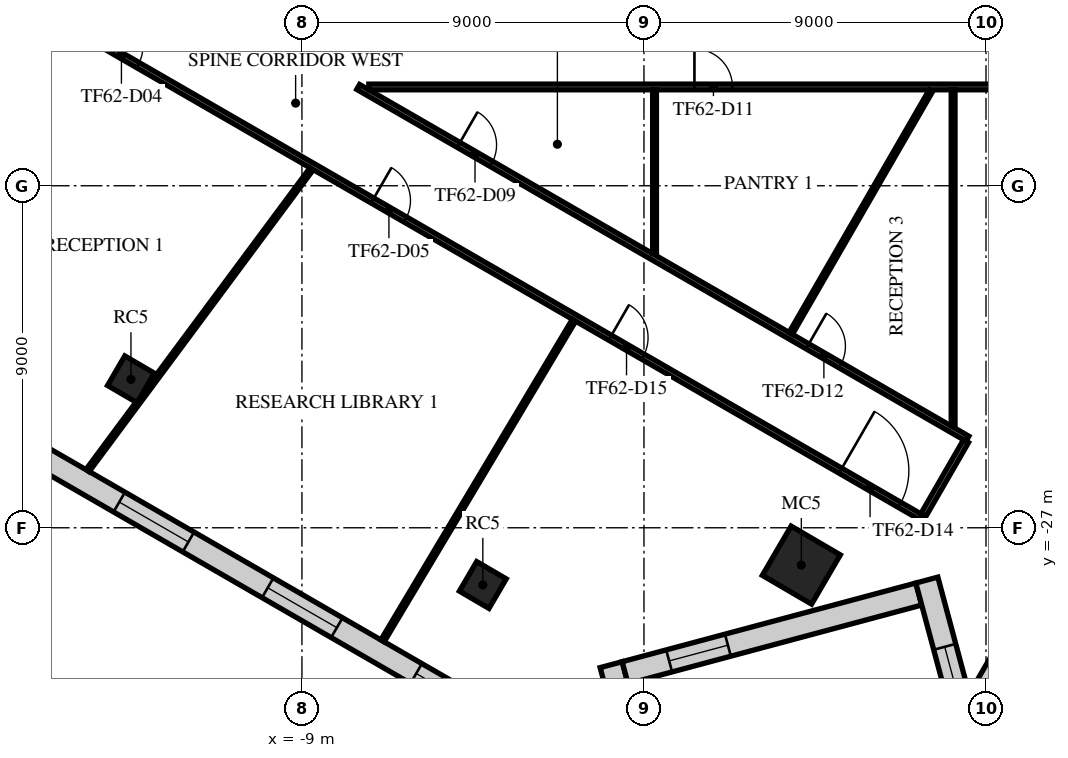
"""IFC4 building model, lengths in metres.
Left out: names, types, materials, properties, quantities, classifications, styles, units other than length and angle.
Written with IfcOpenShell. Run it as: python <this file> out.ifc"""

import sys

from ifc_helpers import new_model, si_unit, direction, frame, frame_2d, origin, origin_2d, place, context, subcontext, project, spatial, rectangle, extrude, element, fill, save


model = new_model("IFC4")
c1 = context("Model", 3, precision=1e-05, world=origin(), true_north=direction((0.0, 1.0)))
c2 = subcontext(c1, "Body", "Model", "MODEL_VIEW")
j1 = project(units=[si_unit("LENGTHUNIT", "METRE"), si_unit("PLANEANGLEUNIT", "RADIAN")], contexts=[c1])
p1 = place(None, origin())
s1 = spatial("IfcSite", under=j1, at=p1, CompositionType="ELEMENT")
p2 = place(p1, origin())
s2 = spatial("IfcBuilding", under=s1, at=p2, CompositionType="ELEMENT")
p3 = place(p2, frame((0.0, 0.0, 262.9)))
s3 = spatial("IfcBuildingStorey", under=s2, at=p3, CompositionType="ELEMENT", Elevation=262.9)
for number, where, z_axis, x_axis in (
    (1, (-13.499, -23.094, 0.0), (0.0, 0.0, 1.0), (0.505, 0.863, 0.0)),
    (2, (-4.24, -28.506, 0.0), (0.0, 0.0, 1.0), (0.505, 0.863, 0.0)),
):
    element("IfcColumn", number, at=place(p3, frame(where, z_axis=z_axis, x_axis=x_axis)), inside=s3, PredefinedType="COLUMN", context=c2, shape_type="SweptSolid", body=[
        extrude(rectangle(XDim=0.9, YDim=0.9, at=origin_2d()), origin(), (0.0, 0.0, 1.0), 4.0),
    ])
p4 = place(p3, frame((4.141, -27.983, 0.0), z_axis=(0.0, 0.0, 1.0), x_axis=(0.504643651291, 0.863327739165, 0.0)))
e3 = element("IfcColumn", 3, at=p4, inside=s3, PredefinedType="COLUMN", context=c2, shape_type="SweptSolid", body=[
    extrude(rectangle(XDim=1.5, YDim=1.5, at=origin_2d()), origin(), (0.0, 0.0, 1.0), 4.0),
])
p5 = place(p3, frame((-30.476, -16.699, 0.0), z_axis=(0.0, 0.0, 1.0), x_axis=(0.866027969777, -0.499995555543, 0.0)))
e4 = element("IfcWall", 4, at=p5, inside=s3, PredefinedType="STANDARD", context=c2, shape_type="SweptSolid", body=[
    extrude(rectangle(XDim=36.086, YDim=0.6, at=frame_2d((18.043, 0.0))), origin(), (0.0, 0.0, 1.0), 3.64),
])
p6 = place(p5, frame((1.205, 0.0, 0.9)))
e5 = element("IfcOpeningElement", 5, at=p6, cuts=e4, PredefinedType="OPENING", context=c2, shape_type="SweptSolid", body=[
    extrude(rectangle(XDim=2.1, YDim=2.1, at=frame_2d((1.05, 1.05))), frame((0.0, 0.31, 0.0), z_axis=(0.0, -1.0, 0.0), x_axis=(1.0, 0.0, 0.0)), (0.0, 0.0, 1.0), 0.62),
])
p7 = place(p5, frame((5.716, 0.0, 0.9)))
e6 = element("IfcOpeningElement", 6, at=p7, cuts=e4, PredefinedType="OPENING", context=c2, shape_type="SweptSolid", body=[
    extrude(rectangle(XDim=2.1, YDim=2.1, at=frame_2d((1.05, 1.05))), frame((0.0, 0.31, 0.0), z_axis=(0.0, -1.0, 0.0), x_axis=(1.0, 0.0, 0.0)), (0.0, 0.0, 1.0), 0.62),
])
p8 = place(p5, frame((10.227, 0.0, 0.9)))
e7 = element("IfcOpeningElement", 7, at=p8, cuts=e4, PredefinedType="OPENING", context=c2, shape_type="SweptSolid", body=[
    extrude(rectangle(XDim=2.1, YDim=2.1, at=frame_2d((1.05, 1.05))), frame((0.0, 0.31, 0.0), z_axis=(0.0, -1.0, 0.0), x_axis=(1.0, 0.0, 0.0)), (0.0, 0.0, 1.0), 0.62),
])
p9 = place(p5, frame((14.738, 0.0, 0.9)))
e8 = element("IfcOpeningElement", 8, at=p9, cuts=e4, PredefinedType="OPENING", context=c2, shape_type="SweptSolid", body=[
    extrude(rectangle(XDim=2.1, YDim=2.1, at=frame_2d((1.05, 1.05))), frame((0.0, 0.31, 0.0), z_axis=(0.0, -1.0, 0.0), x_axis=(1.0, 0.0, 0.0)), (0.0, 0.0, 1.0), 0.62),
])
p10 = place(p5, frame((19.249, 0.0, 0.9)))
e9 = element("IfcOpeningElement", 9, at=p10, cuts=e4, PredefinedType="OPENING", context=c2, shape_type="SweptSolid", body=[
    extrude(rectangle(XDim=2.1, YDim=2.1, at=frame_2d((1.05, 1.05))), frame((0.0, 0.31, 0.0), z_axis=(0.0, -1.0, 0.0), x_axis=(1.0, 0.0, 0.0)), (0.0, 0.0, 1.0), 0.62),
])
p11 = place(p5, frame((23.759, 0.0, 0.9)))
e10 = element("IfcOpeningElement", 10, at=p11, cuts=e4, PredefinedType="OPENING", context=c2, shape_type="SweptSolid", body=[
    extrude(rectangle(XDim=2.1, YDim=2.1, at=frame_2d((1.05, 1.05))), frame((0.0, 0.31, 0.0), z_axis=(0.0, -1.0, 0.0), x_axis=(1.0, 0.0, 0.0)), (0.0, 0.0, 1.0), 0.62),
])
p12 = place(p5, frame((28.27, 0.0, 0.9)))
e11 = element("IfcOpeningElement", 11, at=p12, cuts=e4, PredefinedType="OPENING", context=c2, shape_type="SweptSolid", body=[
    extrude(rectangle(XDim=2.1, YDim=2.1, at=frame_2d((1.05, 1.05))), frame((0.0, 0.31, 0.0), z_axis=(0.0, -1.0, 0.0), x_axis=(1.0, 0.0, 0.0)), (0.0, 0.0, 1.0), 0.62),
])
p13 = place(p5, frame((32.781, 0.0, 0.9)))
e12 = element("IfcOpeningElement", 12, at=p13, cuts=e4, PredefinedType="OPENING", context=c2, shape_type="SweptSolid", body=[
    extrude(rectangle(XDim=2.1, YDim=2.1, at=frame_2d((1.05, 1.05))), frame((0.0, 0.31, 0.0), z_axis=(0.0, -1.0, 0.0), x_axis=(1.0, 0.0, 0.0)), (0.0, 0.0, 1.0), 0.62),
])
p14 = place(p3, frame((0.336, -35.08, 0.0), z_axis=(0.0, 0.0, 1.0), x_axis=(-0.258796631638, 0.96593183168, 0.0)))
e13 = element("IfcWall", 13, at=p14, inside=s3, PredefinedType="STANDARD", context=c2, shape_type="SweptSolid", body=[
    extrude(rectangle(XDim=4.636, YDim=0.6, at=frame_2d((2.318, 0.0))), origin(), (0.0, 0.0, 1.0), 3.64),
])
p15 = place(p14, frame((1.218, 0.0, 0.9)))
e14 = element("IfcOpeningElement", 14, at=p15, cuts=e13, PredefinedType="OPENING", context=c2, shape_type="SweptSolid", body=[
    extrude(rectangle(XDim=1.6, YDim=2.1, at=frame_2d((0.8, 1.05))), frame((0.0, 0.31, 0.0), z_axis=(0.0, -1.0, 0.0), x_axis=(1.0, 0.0, 0.0)), (0.0, 0.0, 1.0), 0.62),
])
p16 = place(p3, frame((-0.496, -30.814, 0.0), z_axis=(0.0, 0.0, 1.0), x_axis=(0.965926801599, 0.258815405168, 0.0)))
e15 = element("IfcWall", 15, at=p16, inside=s3, PredefinedType="STANDARD", context=c2, shape_type="SweptSolid", body=[
    extrude(rectangle(XDim=8.0, YDim=0.6, at=frame_2d((4.0, 0.0))), origin(), (0.0, 0.0, 1.0), 3.64),
])
p17 = place(p16, frame((1.2, 0.0, 0.9)))
e16 = element("IfcOpeningElement", 16, at=p17, cuts=e15, PredefinedType="OPENING", context=c2, shape_type="SweptSolid", body=[
    extrude(rectangle(XDim=1.6, YDim=2.1, at=frame_2d((0.8, 1.05))), frame((0.0, 0.31, 0.0), z_axis=(0.0, -1.0, 0.0), x_axis=(1.0, 0.0, 0.0)), (0.0, 0.0, 1.0), 0.62),
])
p18 = place(p3, frame((7.443, -28.377, 0.0), z_axis=(0.0, 0.0, 1.0), x_axis=(0.258872105846, -0.965911607144, 0.0)))
e17 = element("IfcWall", 17, at=p18, inside=s3, PredefinedType="STANDARD", context=c2, shape_type="SweptSolid", body=[
    extrude(rectangle(XDim=4.635, YDim=0.6, at=frame_2d((2.318, 0.0))), origin(), (0.0, 0.0, 1.0), 3.64),
])
p19 = place(p18, frame((1.818, 0.0, 0.9)))
e18 = element("IfcOpeningElement", 18, at=p19, cuts=e17, PredefinedType="OPENING", context=c2, shape_type="SweptSolid", body=[
    extrude(rectangle(XDim=1.6, YDim=2.1, at=frame_2d((0.8, 1.05))), frame((0.0, 0.31, 0.0), z_axis=(0.0, -1.0, 0.0), x_axis=(1.0, 0.0, 0.0)), (0.0, 0.0, 1.0), 0.62),
])
p20 = place(p3, frame((8.094, -32.782, 0.0), z_axis=(0.0, 0.0, 1.0), x_axis=(0.499997945818, 0.866026589763, 0.0)))
e19 = element("IfcWall", 19, at=p20, inside=s3, PredefinedType="STANDARD", context=c2, shape_type="SweptSolid", body=[
    extrude(rectangle(XDim=48.686, YDim=0.6, at=frame_2d((24.343, 0.0))), origin(), (0.0, 0.0, 1.0), 3.64),
])
p21 = place(p20, frame((1.213, 0.0, 0.9)))
e20 = element("IfcOpeningElement", 20, at=p21, cuts=e19, PredefinedType="OPENING", context=c2, shape_type="SweptSolid", body=[
    extrude(rectangle(XDim=2.0, YDim=2.1, at=frame_2d((1.0, 1.05))), frame((0.0, 0.31, 0.0), z_axis=(0.0, -1.0, 0.0), x_axis=(1.0, 0.0, 0.0)), (0.0, 0.0, 1.0), 0.62),
])
p22 = place(p20, frame((5.639, 0.0, 0.9)))
e21 = element("IfcOpeningElement", 21, at=p22, cuts=e19, PredefinedType="OPENING", context=c2, shape_type="SweptSolid", body=[
    extrude(rectangle(XDim=2.0, YDim=2.1, at=frame_2d((1.0, 1.05))), frame((0.0, 0.31, 0.0), z_axis=(0.0, -1.0, 0.0), x_axis=(1.0, 0.0, 0.0)), (0.0, 0.0, 1.0), 0.62),
])
p23 = place(p20, frame((10.065, 0.0, 0.9)))
e22 = element("IfcOpeningElement", 22, at=p23, cuts=e19, PredefinedType="OPENING", context=c2, shape_type="SweptSolid", body=[
    extrude(rectangle(XDim=2.0, YDim=2.1, at=frame_2d((1.0, 1.05))), frame((0.0, 0.31, 0.0), z_axis=(0.0, -1.0, 0.0), x_axis=(1.0, 0.0, 0.0)), (0.0, 0.0, 1.0), 0.62),
])
p24 = place(p20, frame((14.491, 0.0, 0.9)))
e23 = element("IfcOpeningElement", 23, at=p24, cuts=e19, PredefinedType="OPENING", context=c2, shape_type="SweptSolid", body=[
    extrude(rectangle(XDim=2.0, YDim=2.1, at=frame_2d((1.0, 1.05))), frame((0.0, 0.31, 0.0), z_axis=(0.0, -1.0, 0.0), x_axis=(1.0, 0.0, 0.0)), (0.0, 0.0, 1.0), 0.62),
])
p25 = place(p20, frame((18.917, 0.0, 0.9)))
e24 = element("IfcOpeningElement", 24, at=p25, cuts=e19, PredefinedType="OPENING", context=c2, shape_type="SweptSolid", body=[
    extrude(rectangle(XDim=2.0, YDim=2.1, at=frame_2d((1.0, 1.05))), frame((0.0, 0.31, 0.0), z_axis=(0.0, -1.0, 0.0), x_axis=(1.0, 0.0, 0.0)), (0.0, 0.0, 1.0), 0.62),
])
p26 = place(p20, frame((23.343, 0.0, 0.9)))
e25 = element("IfcOpeningElement", 25, at=p26, cuts=e19, PredefinedType="OPENING", context=c2, shape_type="SweptSolid", body=[
    extrude(rectangle(XDim=2.0, YDim=2.1, at=frame_2d((1.0, 1.05))), frame((0.0, 0.31, 0.0), z_axis=(0.0, -1.0, 0.0), x_axis=(1.0, 0.0, 0.0)), (0.0, 0.0, 1.0), 0.62),
])
p27 = place(p20, frame((27.769, 0.0, 0.9)))
e26 = element("IfcOpeningElement", 26, at=p27, cuts=e19, PredefinedType="OPENING", context=c2, shape_type="SweptSolid", body=[
    extrude(rectangle(XDim=2.0, YDim=2.1, at=frame_2d((1.0, 1.05))), frame((0.0, 0.31, 0.0), z_axis=(0.0, -1.0, 0.0), x_axis=(1.0, 0.0, 0.0)), (0.0, 0.0, 1.0), 0.62),
])
p28 = place(p20, frame((32.195, 0.0, 0.9)))
e27 = element("IfcOpeningElement", 27, at=p28, cuts=e19, PredefinedType="OPENING", context=c2, shape_type="SweptSolid", body=[
    extrude(rectangle(XDim=2.0, YDim=2.1, at=frame_2d((1.0, 1.05))), frame((0.0, 0.31, 0.0), z_axis=(0.0, -1.0, 0.0), x_axis=(1.0, 0.0, 0.0)), (0.0, 0.0, 1.0), 0.62),
])
p29 = place(p20, frame((36.621, 0.0, 0.9)))
e28 = element("IfcOpeningElement", 28, at=p29, cuts=e19, PredefinedType="OPENING", context=c2, shape_type="SweptSolid", body=[
    extrude(rectangle(XDim=2.0, YDim=2.1, at=frame_2d((1.0, 1.05))), frame((0.0, 0.31, 0.0), z_axis=(0.0, -1.0, 0.0), x_axis=(1.0, 0.0, 0.0)), (0.0, 0.0, 1.0), 0.62),
])
p30 = place(p20, frame((41.047, 0.0, 0.9)))
e29 = element("IfcOpeningElement", 29, at=p30, cuts=e19, PredefinedType="OPENING", context=c2, shape_type="SweptSolid", body=[
    extrude(rectangle(XDim=2.0, YDim=2.1, at=frame_2d((1.0, 1.05))), frame((0.0, 0.31, 0.0), z_axis=(0.0, -1.0, 0.0), x_axis=(1.0, 0.0, 0.0)), (0.0, 0.0, 1.0), 0.62),
])
p31 = place(p20, frame((45.473, 0.0, 0.9)))
e30 = element("IfcOpeningElement", 30, at=p31, cuts=e19, PredefinedType="OPENING", context=c2, shape_type="SweptSolid", body=[
    extrude(rectangle(XDim=2.0, YDim=2.1, at=frame_2d((1.0, 1.05))), frame((0.0, 0.31, 0.0), z_axis=(0.0, -1.0, 0.0), x_axis=(1.0, 0.0, 0.0)), (0.0, 0.0, 1.0), 0.62),
])
p32 = place(p3, frame((-26.744, -7.073, 0.0), z_axis=(0.0, 0.0, 1.0), x_axis=(0.866020890374, -0.500007817374, 0.0)))
e31 = element("IfcWall", 31, at=p32, inside=s3, PredefinedType="PARTITIONING", context=c2, shape_type="SweptSolid", body=[
    extrude(rectangle(XDim=39.324, YDim=0.15, at=frame_2d((19.662, 0.0))), origin(), (0.0, 0.0, 1.0), 3.04),
])
p33 = place(p32, frame((14.505, 0.0, 0.0)))
e32 = element("IfcOpeningElement", 32, at=p33, cuts=e31, PredefinedType="OPENING", context=c2, shape_type="SweptSolid", body=[
    extrude(rectangle(XDim=1.0, YDim=2.1, at=frame_2d((0.5, 1.05))), frame((0.0, 0.085, 0.0), z_axis=(0.0, -1.0, 0.0), x_axis=(1.0, 0.0, 0.0)), (0.0, 0.0, 1.0), 0.17),
])
p34 = place(p32, frame((22.632, 0.0, 0.0)))
e33 = element("IfcOpeningElement", 33, at=p34, cuts=e31, PredefinedType="OPENING", context=c2, shape_type="SweptSolid", body=[
    extrude(rectangle(XDim=1.0, YDim=2.1, at=frame_2d((0.5, 1.05))), frame((0.0, 0.085, 0.0), z_axis=(0.0, -1.0, 0.0), x_axis=(1.0, 0.0, 0.0)), (0.0, 0.0, 1.0), 0.17),
])
p35 = place(p32, frame((36.852, 0.0, 0.0)))
e34 = element("IfcOpeningElement", 34, at=p35, cuts=e31, PredefinedType="OPENING", context=c2, shape_type="SweptSolid", body=[
    extrude(rectangle(XDim=1.8, YDim=2.1, at=frame_2d((0.9, 1.05))), frame((0.0, 0.085, 0.0), z_axis=(0.0, -1.0, 0.0), x_axis=(1.0, 0.0, 0.0)), (0.0, 0.0, 1.0), 0.17),
])
p36 = place(p32, frame((29.852, 0.0, 0.0)))
e35 = element("IfcOpeningElement", 35, at=p36, cuts=e31, PredefinedType="OPENING", context=c2, shape_type="SweptSolid", body=[
    extrude(rectangle(XDim=1.0, YDim=2.1, at=frame_2d((0.5, 1.05))), frame((0.0, 0.085, 0.0), z_axis=(0.0, -1.0, 0.0), x_axis=(1.0, 0.0, 0.0)), (0.0, 0.0, 1.0), 0.17),
])
p37 = place(p3, frame((-7.52, -15.4, 0.0), z_axis=(0.0, 0.0, 1.0), x_axis=(0.86602460502, -0.500001383498, 0.0)))
e36 = element("IfcWall", 36, at=p37, inside=s3, PredefinedType="PARTITIONING", context=c2, shape_type="SweptSolid", body=[
    extrude(rectangle(XDim=18.512, YDim=0.15, at=frame_2d((9.256, 0.0))), origin(), (0.0, 0.0, 1.0), 3.04),
])
p38 = place(p37, frame((3.05, 0.0, 0.0)))
e37 = element("IfcOpeningElement", 37, at=p38, cuts=e36, PredefinedType="OPENING", context=c2, shape_type="SweptSolid", body=[
    extrude(rectangle(XDim=1.0, YDim=2.1, at=frame_2d((0.5, 1.05))), frame((0.0, 0.085, 0.0), z_axis=(0.0, -1.0, 0.0), x_axis=(1.0, 0.0, 0.0)), (0.0, 0.0, 1.0), 0.17),
])
p39 = place(p37, frame((13.65, 0.0, 0.0)))
e38 = element("IfcOpeningElement", 38, at=p39, cuts=e36, PredefinedType="OPENING", context=c2, shape_type="SweptSolid", body=[
    extrude(rectangle(XDim=1.0, YDim=2.1, at=frame_2d((0.5, 1.05))), frame((0.0, 0.085, 0.0), z_axis=(0.0, -1.0, 0.0), x_axis=(1.0, 0.0, 0.0)), (0.0, 0.0, 1.0), 0.17),
])
p40 = place(p3, frame((-7.24, -15.4, 0.0), z_axis=(0.0, 0.0, 1.0), x_axis=(1.0, 0.0, 0.0)))
e39 = element("IfcWall", 39, at=p40, inside=s3, PredefinedType="PARTITIONING", context=c2, shape_type="SweptSolid", body=[
    extrude(rectangle(XDim=22.64, YDim=0.15, at=frame_2d((11.32, 0.0))), origin(), (0.0, 0.0, 1.0), 3.24),
])
p41 = place(p40, frame((8.568, 0.0, 0.0)))
e40 = element("IfcOpeningElement", 40, at=p41, cuts=e39, PredefinedType="OPENING", context=c2, shape_type="SweptSolid", body=[
    extrude(rectangle(XDim=1.0, YDim=2.1, at=frame_2d((0.5, 1.05))), frame((0.0, 0.085, 0.0), z_axis=(0.0, -1.0, 0.0), x_axis=(1.0, 0.0, 0.0)), (0.0, 0.0, 1.0), 0.17),
])
p42 = place(p3, frame((7.35, -26.67, 0.0), z_axis=(0.0, 0.0, 1.0), x_axis=(0.499919672301, 0.866071776036, 0.0)))
e41 = element("IfcWall", 41, at=p42, inside=s3, PredefinedType="PARTITIONING", context=c2, shape_type="SweptSolid", body=[
    extrude(rectangle(XDim=2.25, YDim=0.15, at=frame_2d((1.125, 0.0))), origin(), (0.0, 0.0, 1.0), 3.04),
])
p43 = place(p3, frame((-18.711, -23.143, 0.0), z_axis=(0.0, 0.0, 1.0), x_axis=(0.315197061925, 0.949026244186, 0.0)))
e42 = element("IfcWall", 42, at=p43, inside=s3, PredefinedType="PARTITIONING", context=c2, shape_type="SweptSolid", body=[
    extrude(rectangle(XDim=10.021, YDim=0.1, at=frame_2d((5.011, 0.0))), origin(), (0.0, 0.0, 1.0), 3.04),
])
p44 = place(p3, frame((-14.64, -25.493, 0.0), z_axis=(0.0, 0.0, 1.0), x_axis=(0.596096620962, 0.802912709127, 0.0)))
e43 = element("IfcWall", 43, at=p44, inside=s3, PredefinedType="PARTITIONING", context=c2, shape_type="SweptSolid", body=[
    extrude(rectangle(XDim=9.885, YDim=0.1, at=frame_2d((4.943, 0.0))), origin(), (0.0, 0.0, 1.0), 3.04),
])
p45 = place(p3, frame((-6.878, -29.975, 0.0), z_axis=(0.0, 0.0, 1.0), x_axis=(0.512748240754, 0.858539015772, 0.0)))
e44 = element("IfcWall", 44, at=p45, inside=s3, PredefinedType="PARTITIONING", context=c2, shape_type="SweptSolid", body=[
    extrude(rectangle(XDim=9.827, YDim=0.1, at=frame_2d((4.913, 0.0))), origin(), (0.0, 0.0, 1.0), 3.04),
])
p46 = place(p3, frame((0.278, -19.787, 0.0), z_axis=(0.0, 0.0, 1.0), x_axis=(0.0, 1.0, 0.0)))
e45 = element("IfcWall", 45, at=p46, inside=s3, PredefinedType="PARTITIONING", context=c2, shape_type="SweptSolid", body=[
    extrude(rectangle(XDim=4.312, YDim=0.1, at=frame_2d((2.156, 0.0))), origin(), (0.0, 0.0, 1.0), 3.24),
])
p47 = place(p3, frame((3.863, -21.885, 0.0), z_axis=(0.0, 0.0, 1.0), x_axis=(0.500038702166, 0.866003057926, 0.0)))
e46 = element("IfcWall", 46, at=p47, inside=s3, PredefinedType="PARTITIONING", context=c2, shape_type="SweptSolid", body=[
    extrude(rectangle(XDim=7.373, YDim=0.1, at=frame_2d((3.687, 0.0))), origin(), (0.0, 0.0, 1.0), 3.24),
])
p48 = place(p3, frame((8.135, -24.323, 0.0), z_axis=(0.0, 0.0, 1.0), x_axis=(0.0, 1.0, 0.0)))
e47 = element("IfcWall", 47, at=p48, inside=s3, PredefinedType="PARTITIONING", context=c2, shape_type="SweptSolid", body=[
    extrude(rectangle(XDim=8.847, YDim=0.1, at=frame_2d((4.424, 0.0))), origin(), (0.0, 0.0, 1.0), 3.24),
])
p49 = place(p10, origin())
e48 = element("IfcWindow", 48, at=p49, inside=s3, PartitioningType="SINGLE_PANEL", PredefinedType="WINDOW", context=c2, shape_type="SweptSolid", body=[
    extrude(rectangle(XDim=2.1, YDim=2.1, at=frame_2d((1.05, 1.05))), frame((0.0, 0.03, 0.0), z_axis=(0.0, -1.0, 0.0), x_axis=(1.0, 0.0, 0.0)), (0.0, 0.0, 1.0), 0.06),
])
fill(e9, e48)
p50 = place(p11, origin())
e49 = element("IfcWindow", 49, at=p50, inside=s3, PartitioningType="SINGLE_PANEL", PredefinedType="WINDOW", context=c2, shape_type="SweptSolid", body=[
    extrude(rectangle(XDim=2.1, YDim=2.1, at=frame_2d((1.05, 1.05))), frame((0.0, 0.03, 0.0), z_axis=(0.0, -1.0, 0.0), x_axis=(1.0, 0.0, 0.0)), (0.0, 0.0, 1.0), 0.06),
])
fill(e10, e49)
p51 = place(p12, origin())
e50 = element("IfcWindow", 50, at=p51, inside=s3, PartitioningType="SINGLE_PANEL", PredefinedType="WINDOW", context=c2, shape_type="SweptSolid", body=[
    extrude(rectangle(XDim=2.1, YDim=2.1, at=frame_2d((1.05, 1.05))), frame((0.0, 0.03, 0.0), z_axis=(0.0, -1.0, 0.0), x_axis=(1.0, 0.0, 0.0)), (0.0, 0.0, 1.0), 0.06),
])
fill(e11, e50)
p52 = place(p17, origin())
e51 = element("IfcWindow", 51, at=p52, inside=s3, PartitioningType="SINGLE_PANEL", PredefinedType="WINDOW", context=c2, shape_type="SweptSolid", body=[
    extrude(rectangle(XDim=1.6, YDim=2.1, at=frame_2d((0.8, 1.05))), frame((0.0, 0.03, 0.0), z_axis=(0.0, -1.0, 0.0), x_axis=(1.0, 0.0, 0.0)), (0.0, 0.0, 1.0), 0.06),
])
fill(e16, e51)
p53 = place(p19, origin())
e52 = element("IfcWindow", 52, at=p53, inside=s3, PartitioningType="SINGLE_PANEL", PredefinedType="WINDOW", context=c2, shape_type="SweptSolid", body=[
    extrude(rectangle(XDim=1.6, YDim=2.1, at=frame_2d((0.8, 1.05))), frame((0.0, 0.03, 0.0), z_axis=(0.0, -1.0, 0.0), x_axis=(1.0, 0.0, 0.0)), (0.0, 0.0, 1.0), 0.06),
])
fill(e18, e52)
p54 = place(p21, origin())
e53 = element("IfcWindow", 53, at=p54, inside=s3, PartitioningType="SINGLE_PANEL", PredefinedType="WINDOW", context=c2, shape_type="SweptSolid", body=[
    extrude(rectangle(XDim=2.0, YDim=2.1, at=frame_2d((1.0, 1.05))), frame((0.0, 0.03, 0.0), z_axis=(0.0, -1.0, 0.0), x_axis=(1.0, 0.0, 0.0)), (0.0, 0.0, 1.0), 0.06),
])
fill(e20, e53)
p55 = place(p33, frame((1.0, 0.0, 0.0), z_axis=(0.0, 0.0, 1.0), x_axis=(-1.0, 0.0, 0.0)))
e54 = element("IfcDoor", 54, at=p55, inside=s3, OperationType="SINGLE_SWING_LEFT", PredefinedType="DOOR", context=c2, shape_type="SweptSolid", body=[
    extrude(rectangle(XDim=1.0, YDim=2.1, at=frame_2d((0.5, 1.05))), frame((0.0, 0.025, 0.0), z_axis=(0.0, -1.0, 0.0), x_axis=(1.0, 0.0, 0.0)), (0.0, 0.0, 1.0), 0.05),
])
fill(e32, e54)
p56 = place(p34, frame((1.0, 0.0, 0.0), z_axis=(0.0, 0.0, 1.0), x_axis=(-1.0, 0.0, 0.0)))
e55 = element("IfcDoor", 55, at=p56, inside=s3, OperationType="SINGLE_SWING_RIGHT", PredefinedType="DOOR", context=c2, shape_type="SweptSolid", body=[
    extrude(rectangle(XDim=1.0, YDim=2.1, at=frame_2d((0.5, 1.05))), frame((0.0, 0.025, 0.0), z_axis=(0.0, -1.0, 0.0), x_axis=(1.0, 0.0, 0.0)), (0.0, 0.0, 1.0), 0.05),
])
fill(e33, e55)
p57 = place(p38, origin())
e56 = element("IfcDoor", 56, at=p57, inside=s3, OperationType="SINGLE_SWING_LEFT", PredefinedType="DOOR", context=c2, shape_type="SweptSolid", body=[
    extrude(rectangle(XDim=1.0, YDim=2.1, at=frame_2d((0.5, 1.05))), frame((0.0, 0.025, 0.0), z_axis=(0.0, -1.0, 0.0), x_axis=(1.0, 0.0, 0.0)), (0.0, 0.0, 1.0), 0.05),
])
fill(e37, e56)
p58 = place(p41, frame((1.0, 0.0, 0.0), z_axis=(0.0, 0.0, 1.0), x_axis=(-1.0, 0.0, 0.0)))
e57 = element("IfcDoor", 57, at=p58, inside=s3, OperationType="SINGLE_SWING_RIGHT", PredefinedType="DOOR", context=c2, shape_type="SweptSolid", body=[
    extrude(rectangle(XDim=1.0, YDim=2.1, at=frame_2d((0.5, 1.05))), frame((0.0, 0.025, 0.0), z_axis=(0.0, -1.0, 0.0), x_axis=(1.0, 0.0, 0.0)), (0.0, 0.0, 1.0), 0.05),
])
fill(e40, e57)
p59 = place(p39, origin())
e58 = element("IfcDoor", 58, at=p59, inside=s3, OperationType="SINGLE_SWING_RIGHT", PredefinedType="DOOR", context=c2, shape_type="SweptSolid", body=[
    extrude(rectangle(XDim=1.0, YDim=2.1, at=frame_2d((0.5, 1.05))), frame((0.0, 0.025, 0.0), z_axis=(0.0, -1.0, 0.0), x_axis=(1.0, 0.0, 0.0)), (0.0, 0.0, 1.0), 0.05),
])
fill(e38, e58)
p60 = place(p35, frame((1.8, 0.0, 0.0), z_axis=(0.0, 0.0, 1.0), x_axis=(-1.0, 0.0, 0.0)))
e59 = element("IfcDoor", 59, at=p60, inside=s3, OperationType="DOUBLE_DOOR_SINGLE_SWING", PredefinedType="DOOR", context=c2, shape_type="SweptSolid", body=[
    extrude(rectangle(XDim=1.8, YDim=2.1, at=frame_2d((0.9, 1.05))), frame((0.0, 0.025, 0.0), z_axis=(0.0, -1.0, 0.0), x_axis=(1.0, 0.0, 0.0)), (0.0, 0.0, 1.0), 0.05),
])
fill(e34, e59)
p61 = place(p36, frame((1.0, 0.0, 0.0), z_axis=(0.0, 0.0, 1.0), x_axis=(-1.0, 0.0, 0.0)))
e60 = element("IfcDoor", 60, at=p61, inside=s3, OperationType="SINGLE_SWING_RIGHT", PredefinedType="DOOR", context=c2, shape_type="SweptSolid", body=[
    extrude(rectangle(XDim=1.0, YDim=2.1, at=frame_2d((0.5, 1.05))), frame((0.0, 0.025, 0.0), z_axis=(0.0, -1.0, 0.0), x_axis=(1.0, 0.0, 0.0)), (0.0, 0.0, 1.0), 0.05),
])
fill(e35, e60)
save(model, sys.argv[1])
